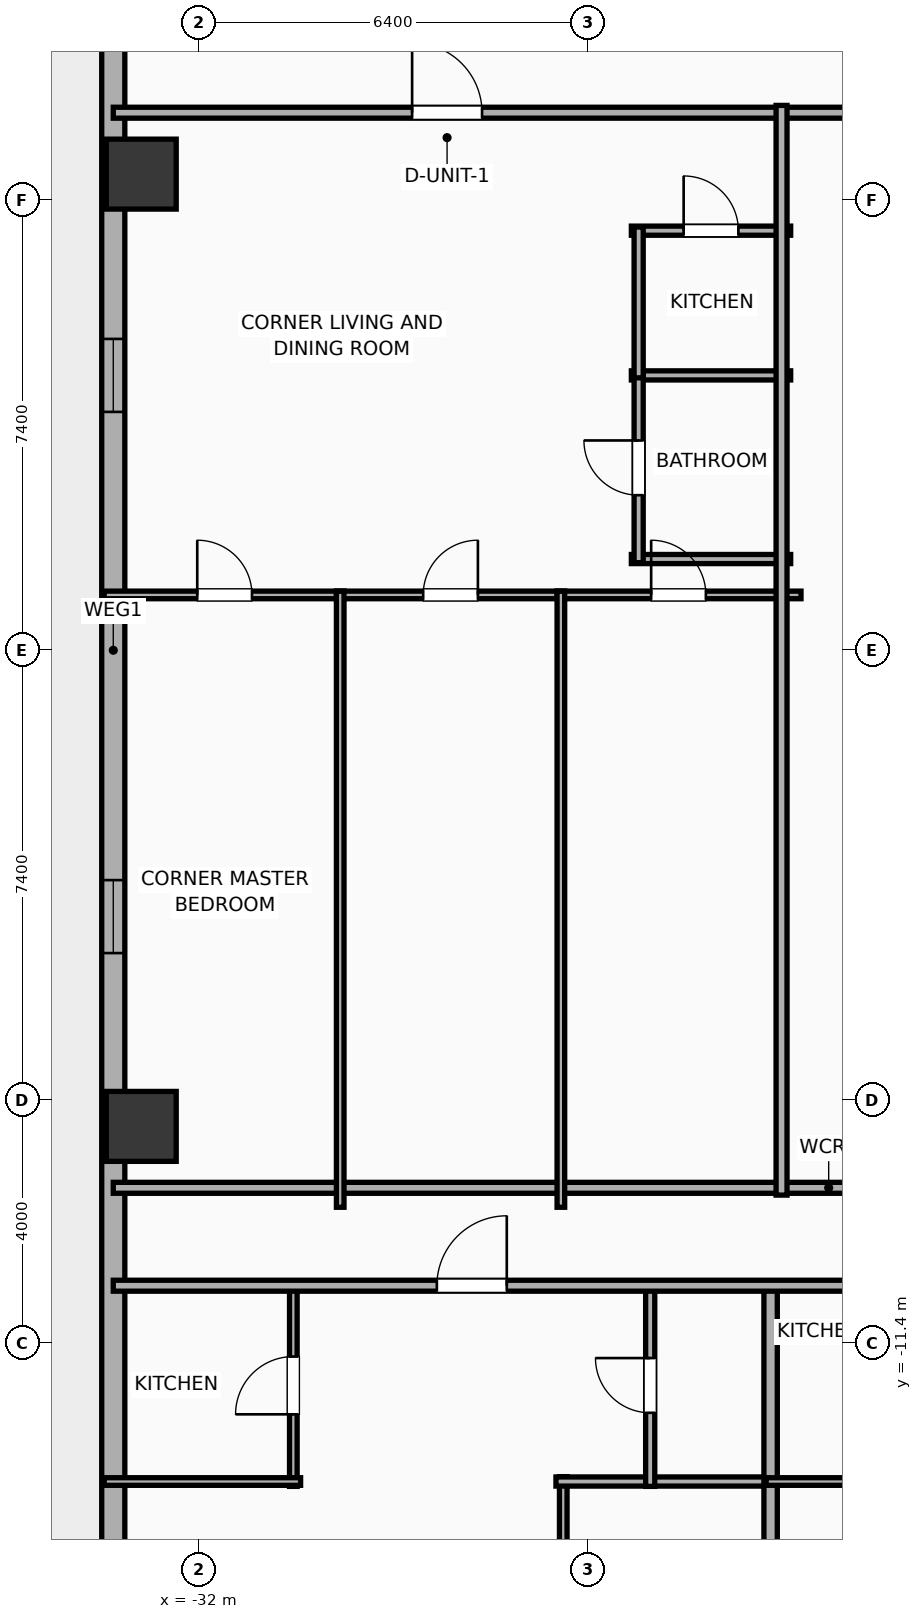
"""IFC4 building model, lengths in metres.
Left out: names, types, materials, properties, quantities, classifications, styles, units other than length and angle.
Written with IfcOpenShell. Run it as: python <this file> out.ifc"""

import sys

from ifc_helpers import new_model, si_unit, direction, frame, frame_2d, origin, origin_2d, place, context, subcontext, project, spatial, rectangle, hollow_rectangle, extrude, element, fill, save


model = new_model("IFC4")
c1 = context("Model", 3, precision=1e-05, world=origin(), true_north=direction((0.0, 1.0)))
c2 = subcontext(c1, "Body", "Model", "MODEL_VIEW")
j1 = project(units=[si_unit("LENGTHUNIT", "METRE"), si_unit("PLANEANGLEUNIT", "RADIAN")], contexts=[c1])
p1 = place(None, origin())
s1 = spatial("IfcSite", under=j1, at=p1, CompositionType="ELEMENT")
p2 = place(p1, origin())
s2 = spatial("IfcBuilding", under=s1, at=p2, CompositionType="ELEMENT")
p3 = place(p2, frame((0.0, 0.0, 26.0)))
s3 = spatial("IfcBuildingStorey", under=s2, at=p3, CompositionType="ELEMENT", Elevation=26.0)
for number, where, z_axis, x_axis in (
    (1, (-32.95, 7.83, -0.25), (0.0, 0.0, 1.0), (1.0, 0.0, 0.0)),
    (2, (-32.95, -7.83, -0.25), (0.0, 0.0, 1.0), (1.0, 0.0, 0.0)),
):
    element("IfcColumn", number, at=place(p3, frame(where, z_axis=z_axis, x_axis=x_axis)), inside=s3, PredefinedType="COLUMN", context=c2, shape_type="SweptSolid", body=[
        extrude(hollow_rectangle(XDim=1.15, YDim=1.15, WallThickness=0.04, at=origin_2d()), origin(), (0.0, 0.0, 1.0), 4.15),
    ])
p4 = place(p3, frame((-33.41, -18.381, 0.0), z_axis=(0.0, 0.0, 1.0), x_axis=(0.0, 1.0, 0.0)))
e3 = element("IfcWall", 3, at=p4, inside=s3, PredefinedType="ELEMENTEDWALL", context=c2, shape_type="SweptSolid", body=[
    extrude(rectangle(XDim=36.763, YDim=0.38, at=frame_2d((18.381, 0.0))), origin(), (0.0, 0.0, 1.0), 2.54),
])
p5 = place(p4, frame((33.362, 0.0, 0.75)))
e4 = element("IfcOpeningElement", 4, at=p5, cuts=e3, PredefinedType="OPENING", context=c2, shape_type="SweptSolid", body=[
    extrude(rectangle(XDim=1.2, YDim=1.63, at=frame_2d((0.6, 0.815))), frame((0.0, 0.2, 0.0), z_axis=(0.0, -1.0, 0.0), x_axis=(1.0, 0.0, 0.0)), (0.0, 0.0, 1.0), 0.4),
])
p6 = place(p4, frame((22.301, 0.0, 0.75)))
e5 = element("IfcOpeningElement", 5, at=p6, cuts=e3, PredefinedType="OPENING", context=c2, shape_type="SweptSolid", body=[
    extrude(rectangle(XDim=1.2, YDim=1.63, at=frame_2d((0.6, 0.815))), frame((0.0, 0.2, 0.0), z_axis=(0.0, -1.0, 0.0), x_axis=(1.0, 0.0, 0.0)), (0.0, 0.0, 1.0), 0.4),
])
p7 = place(p4, frame((13.401, 0.0, 0.75)))
e6 = element("IfcOpeningElement", 6, at=p7, cuts=e3, PredefinedType="OPENING", context=c2, shape_type="SweptSolid", body=[
    extrude(rectangle(XDim=1.2, YDim=1.63, at=frame_2d((0.6, 0.815))), frame((0.0, 0.2, 0.0), z_axis=(0.0, -1.0, 0.0), x_axis=(1.0, 0.0, 0.0)), (0.0, 0.0, 1.0), 0.4),
])
p8 = place(p3, frame((-33.41, 8.84, 0.0), z_axis=(0.0, 0.0, 1.0), x_axis=(1.0, 0.0, 0.0)))
e7 = element("IfcWall", 7, at=p8, inside=s3, PredefinedType="PARTITIONING", context=c2, shape_type="SweptSolid", body=[
    extrude(rectangle(XDim=23.53, YDim=0.18, at=frame_2d((11.765, 0.0))), origin(), (0.0, 0.0, 1.0), 3.65),
])
p9 = place(p8, frame((4.915, 0.0, 0.0)))
e8 = element("IfcOpeningElement", 8, at=p9, cuts=e7, PredefinedType="OPENING", context=c2, shape_type="SweptSolid", body=[
    extrude(rectangle(XDim=1.15, YDim=2.05, at=frame_2d((0.575, 1.025))), frame((0.0, 0.1, 0.0), z_axis=(0.0, -1.0, 0.0), x_axis=(1.0, 0.0, 0.0)), (0.0, 0.0, 1.0), 0.2),
])
p10 = place(p3, frame((-33.41, -8.84, 0.0), z_axis=(0.0, 0.0, 1.0), x_axis=(1.0, 0.0, 0.0)))
e9 = element("IfcWall", 9, at=p10, inside=s3, PredefinedType="PARTITIONING", context=c2, shape_type="SweptSolid", body=[
    extrude(rectangle(XDim=23.53, YDim=0.18, at=frame_2d((11.765, 0.0))), origin(), (0.0, 0.0, 1.0), 3.65),
])
p11 = place(p3, frame((-26.01, -22.36, 0.0), z_axis=(0.0, 0.0, 1.0), x_axis=(0.0, 1.0, 0.0)))
e10 = element("IfcWall", 10, at=p11, inside=s3, PredefinedType="PARTITIONING", context=c2, shape_type="SweptSolid", body=[
    extrude(rectangle(XDim=8.77, YDim=0.125, at=frame_2d((4.385, 0.0))), origin(), (0.0, 0.0, 1.0), 3.65),
])
p12 = place(p11, frame((6.215, 0.0, 0.0)))
e11 = element("IfcOpeningElement", 11, at=p12, cuts=e10, PredefinedType="OPENING", context=c2, shape_type="SweptSolid", body=[
    extrude(rectangle(XDim=0.9, YDim=2.05, at=frame_2d((0.45, 1.025))), frame((0.0, 0.073, 0.0), z_axis=(0.0, -1.0, 0.0), x_axis=(1.0, 0.0, 0.0)), (0.0, 0.0, 1.0), 0.145),
])
p13 = place(p3, frame((-26.13, -13.67, 0.0), z_axis=(0.0, 0.0, 1.0), x_axis=(1.0, 0.0, 0.0)))
e12 = element("IfcWall", 12, at=p13, inside=s3, PredefinedType="PLUMBINGWALL", context=c2, shape_type="SweptSolid", body=[
    extrude(rectangle(XDim=3.605, YDim=0.15, at=frame_2d((1.802, 0.0))), origin(), (0.0, 0.0, 1.0), 3.65),
])
p14 = place(p3, frame((-30.449, -13.75, 0.0), z_axis=(0.0, 0.0, 1.0), x_axis=(0.0, 1.0, 0.0)))
e13 = element("IfcWall", 13, at=p14, inside=s3, PredefinedType="PARTITIONING", context=c2, shape_type="SweptSolid", body=[
    extrude(rectangle(XDim=3.32, YDim=0.125, at=frame_2d((1.66, 0.0))), origin(), (0.0, 0.0, 1.0), 3.65),
])
p15 = place(p14, frame((1.185, 0.0, 0.0)))
e14 = element("IfcOpeningElement", 14, at=p15, cuts=e13, PredefinedType="OPENING", context=c2, shape_type="SweptSolid", body=[
    extrude(rectangle(XDim=0.95, YDim=2.05, at=frame_2d((0.475, 1.025))), frame((0.0, 0.073, 0.0), z_axis=(0.0, -1.0, 0.0), x_axis=(1.0, 0.0, 0.0)), (0.0, 0.0, 1.0), 0.145),
])
p16 = place(p3, frame((-33.56, -13.67, 0.0), z_axis=(0.0, 0.0, 1.0), x_axis=(1.0, 0.0, 0.0)))
e15 = element("IfcWall", 15, at=p16, inside=s3, PredefinedType="PARTITIONING", context=c2, shape_type="SweptSolid", body=[
    extrude(rectangle(XDim=3.231, YDim=0.125, at=frame_2d((1.615, 0.0))), origin(), (0.0, 0.0, 1.0), 3.65),
])
p17 = place(p3, frame((-24.58, -13.75, 0.0), z_axis=(0.0, 0.0, 1.0), x_axis=(0.0, 1.0, 0.0)))
e16 = element("IfcWall", 16, at=p17, inside=s3, PredefinedType="PLUMBINGWALL", context=c2, shape_type="SweptSolid", body=[
    extrude(rectangle(XDim=3.32, YDim=0.15, at=frame_2d((1.66, 0.0))), origin(), (0.0, 0.0, 1.0), 3.65),
])
p18 = place(p17, frame((1.21, 0.0, 0.0)))
e17 = element("IfcOpeningElement", 17, at=p18, cuts=e16, PredefinedType="OPENING", context=c2, shape_type="SweptSolid", body=[
    extrude(rectangle(XDim=0.9, YDim=2.05, at=frame_2d((0.45, 1.025))), frame((0.0, 0.085, 0.0), z_axis=(0.0, -1.0, 0.0), x_axis=(1.0, 0.0, 0.0)), (0.0, 0.0, 1.0), 0.17),
])
p19 = place(p3, frame((-22.6, -22.21, 0.0), z_axis=(0.0, 0.0, 1.0), x_axis=(0.0, 1.0, 0.0)))
e18 = element("IfcWall", 18, at=p19, inside=s3, PredefinedType="PARTITIONING", context=c2, shape_type="SweptSolid", body=[
    extrude(rectangle(XDim=11.84, YDim=0.22, at=frame_2d((5.92, 0.0))), origin(), (0.0, 0.0, 1.0), 3.65),
])
p20 = place(p3, frame((-22.675, -13.67, 0.0), z_axis=(0.0, 0.0, 1.0), x_axis=(1.0, 0.0, 0.0)))
e19 = element("IfcWall", 19, at=p20, inside=s3, PredefinedType="PARTITIONING", context=c2, shape_type="SweptSolid", body=[
    extrude(rectangle(XDim=2.505, YDim=0.125, at=frame_2d((1.252, 0.0))), origin(), (0.0, 0.0, 1.0), 3.65),
])
p21 = place(p3, frame((-33.41, -10.45, 0.0), z_axis=(0.0, 0.0, 1.0), x_axis=(1.0, 0.0, 0.0)))
e20 = element("IfcWall", 20, at=p21, inside=s3, PredefinedType="PARTITIONING", context=c2, shape_type="SweptSolid", body=[
    extrude(rectangle(XDim=59.62, YDim=0.18, at=frame_2d((29.81, 0.0))), origin(), (0.0, 0.0, 1.0), 3.65),
])
p22 = place(p21, frame((5.321, 0.0, 0.0)))
e21 = element("IfcOpeningElement", 21, at=p22, cuts=e20, PredefinedType="OPENING", context=c2, shape_type="SweptSolid", body=[
    extrude(rectangle(XDim=1.15, YDim=2.05, at=frame_2d((0.575, 1.025))), frame((0.0, 0.1, 0.0), z_axis=(0.0, -1.0, 0.0), x_axis=(1.0, 0.0, 0.0)), (0.0, 0.0, 1.0), 0.2),
])
p23 = place(p21, frame((14.3, 0.0, 0.0)))
e22 = element("IfcOpeningElement", 22, at=p23, cuts=e20, PredefinedType="OPENING", context=c2, shape_type="SweptSolid", body=[
    extrude(rectangle(XDim=1.15, YDim=2.05, at=frame_2d((0.575, 1.025))), frame((0.0, 0.1, 0.0), z_axis=(0.0, -1.0, 0.0), x_axis=(1.0, 0.0, 0.0)), (0.0, 0.0, 1.0), 0.2),
])
p24 = place(p21, frame((22.265, 0.0, 0.0)))
e23 = element("IfcOpeningElement", 23, at=p24, cuts=e20, PredefinedType="OPENING", context=c2, shape_type="SweptSolid", body=[
    extrude(rectangle(XDim=0.9, YDim=2.05, at=frame_2d((0.45, 1.025))), frame((0.0, 0.1, 0.0), z_axis=(0.0, -1.0, 0.0), x_axis=(1.0, 0.0, 0.0)), (0.0, 0.0, 1.0), 0.2),
])
p25 = place(p21, frame((29.903, 0.0, 0.0)))
e24 = element("IfcOpeningElement", 24, at=p25, cuts=e20, PredefinedType="OPENING", context=c2, shape_type="SweptSolid", body=[
    extrude(rectangle(XDim=1.15, YDim=2.05, at=frame_2d((0.575, 1.025))), frame((0.0, 0.1, 0.0), z_axis=(0.0, -1.0, 0.0), x_axis=(1.0, 0.0, 0.0)), (0.0, 0.0, 1.0), 0.2),
])
p26 = place(p21, frame((37.701, 0.0, 0.0)))
e25 = element("IfcOpeningElement", 25, at=p26, cuts=e20, PredefinedType="OPENING", context=c2, shape_type="SweptSolid", body=[
    extrude(rectangle(XDim=1.15, YDim=2.05, at=frame_2d((0.575, 1.025))), frame((0.0, 0.1, 0.0), z_axis=(0.0, -1.0, 0.0), x_axis=(1.0, 0.0, 0.0)), (0.0, 0.0, 1.0), 0.2),
])
p27 = place(p21, frame((45.654, 0.0, 0.0)))
e26 = element("IfcOpeningElement", 26, at=p27, cuts=e20, PredefinedType="OPENING", context=c2, shape_type="SweptSolid", body=[
    extrude(rectangle(XDim=0.9, YDim=2.05, at=frame_2d((0.45, 1.025))), frame((0.0, 0.1, 0.0), z_axis=(0.0, -1.0, 0.0), x_axis=(1.0, 0.0, 0.0)), (0.0, 0.0, 1.0), 0.2),
])
p28 = place(p21, frame((54.472, 0.0, 0.0)))
e27 = element("IfcOpeningElement", 27, at=p28, cuts=e20, PredefinedType="OPENING", context=c2, shape_type="SweptSolid", body=[
    extrude(rectangle(XDim=1.15, YDim=2.05, at=frame_2d((0.575, 1.025))), frame((0.0, 0.1, 0.0), z_axis=(0.0, -1.0, 0.0), x_axis=(1.0, 0.0, 0.0)), (0.0, 0.0, 1.0), 0.2),
])
p29 = place(p3, frame((-24.89, 6.9, 0.0), z_axis=(0.0, 0.0, 1.0), x_axis=(1.0, 0.0, 0.0)))
e28 = element("IfcWall", 28, at=p29, inside=s3, PredefinedType="PLUMBINGWALL", context=c2, shape_type="SweptSolid", body=[
    extrude(rectangle(XDim=2.62, YDim=0.15, at=frame_2d((1.31, 0.0))), origin(), (0.0, 0.0, 1.0), 2.54),
])
p30 = place(p29, frame((0.86, 0.0, 0.0)))
e29 = element("IfcOpeningElement", 29, at=p30, cuts=e28, PredefinedType="OPENING", context=c2, shape_type="SweptSolid", body=[
    extrude(rectangle(XDim=0.9, YDim=2.05, at=frame_2d((0.45, 1.025))), frame((0.0, 0.085, 0.0), z_axis=(0.0, -1.0, 0.0), x_axis=(1.0, 0.0, 0.0)), (0.0, 0.0, 1.0), 0.17),
])
for number, where, z_axis, x_axis in (
    (30, (-24.89, 4.52, 0.0), (0.0, 0.0, 1.0), (1.0, 0.0, 0.0)),
    (31, (-24.89, 1.5, 0.0), (0.0, 0.0, 1.0), (1.0, 0.0, 0.0)),
):
    element("IfcWall", number, at=place(p3, frame(where, z_axis=z_axis, x_axis=x_axis)), inside=s3, PredefinedType="PLUMBINGWALL", context=c2, shape_type="SweptSolid", body=[
        extrude(rectangle(XDim=2.62, YDim=0.15, at=frame_2d((1.31, 0.0))), origin(), (0.0, 0.0, 1.0), 3.65),
    ])
p31 = place(p3, frame((-24.77, 1.44, 0.0), z_axis=(0.0, 0.0, 1.0), x_axis=(0.0, 1.0, 0.0)))
e32 = element("IfcWall", 32, at=p31, inside=s3, PredefinedType="PLUMBINGWALL", context=c2, shape_type="SweptSolid", body=[
    extrude(rectangle(XDim=3.12, YDim=0.15, at=frame_2d((1.56, 0.0))), origin(), (0.0, 0.0, 1.0), 3.65),
])
p32 = place(p31, frame((1.11, 0.0, 0.0)))
e33 = element("IfcOpeningElement", 33, at=p32, cuts=e32, PredefinedType="OPENING", context=c2, shape_type="SweptSolid", body=[
    extrude(rectangle(XDim=0.9, YDim=2.05, at=frame_2d((0.45, 1.025))), frame((0.0, 0.085, 0.0), z_axis=(0.0, -1.0, 0.0), x_axis=(1.0, 0.0, 0.0)), (0.0, 0.0, 1.0), 0.17),
])
p33 = place(p3, frame((-24.77, 4.48, 0.0), z_axis=(0.0, 0.0, 1.0), x_axis=(0.0, 1.0, 0.0)))
e34 = element("IfcWall", 34, at=p33, inside=s3, PredefinedType="PLUMBINGWALL", context=c2, shape_type="SweptSolid", body=[
    extrude(rectangle(XDim=2.48, YDim=0.15, at=frame_2d((1.24, 0.0))), origin(), (0.0, 0.0, 1.0), 3.65),
])
p34 = place(p3, frame((-33.56, 0.91, 0.0), z_axis=(0.0, 0.0, 1.0), x_axis=(1.0, 0.0, 0.0)))
e35 = element("IfcWall", 35, at=p34, inside=s3, PredefinedType="PARTITIONING", context=c2, shape_type="SweptSolid", body=[
    extrude(rectangle(XDim=3.945, YDim=0.125, at=frame_2d((1.972, 0.0))), origin(), (0.0, 0.0, 1.0), 3.65),
])
p35 = place(p34, frame((1.531, 0.0, 0.0)))
e36 = element("IfcOpeningElement", 36, at=p35, cuts=e35, PredefinedType="OPENING", context=c2, shape_type="SweptSolid", body=[
    extrude(rectangle(XDim=0.9, YDim=2.05, at=frame_2d((0.45, 1.025))), frame((0.0, 0.073, 0.0), z_axis=(0.0, -1.0, 0.0), x_axis=(1.0, 0.0, 0.0)), (0.0, 0.0, 1.0), 0.145),
])
p36 = place(p3, frame((-29.74, 0.91, 0.0), z_axis=(0.0, 0.0, 1.0), x_axis=(1.0, 0.0, 0.0)))
e37 = element("IfcWall", 37, at=p36, inside=s3, PredefinedType="PARTITIONING", context=c2, shape_type="SweptSolid", body=[
    extrude(rectangle(XDim=3.754, YDim=0.125, at=frame_2d((1.877, 0.0))), origin(), (0.0, 0.0, 1.0), 3.65),
])
p37 = place(p36, frame((1.427, 0.0, 0.0)))
e38 = element("IfcOpeningElement", 38, at=p37, cuts=e37, PredefinedType="OPENING", context=c2, shape_type="SweptSolid", body=[
    extrude(rectangle(XDim=0.9, YDim=2.05, at=frame_2d((0.45, 1.025))), frame((0.0, 0.073, 0.0), z_axis=(0.0, -1.0, 0.0), x_axis=(1.0, 0.0, 0.0)), (0.0, 0.0, 1.0), 0.145),
])
p38 = place(p3, frame((-26.112, 0.91, 0.0), z_axis=(0.0, 0.0, 1.0), x_axis=(1.0, 0.0, 0.0)))
e39 = element("IfcWall", 39, at=p38, inside=s3, PredefinedType="PARTITIONING", context=c2, shape_type="SweptSolid", body=[
    extrude(rectangle(XDim=4.011, YDim=0.125, at=frame_2d((2.006, 0.0))), origin(), (0.0, 0.0, 1.0), 3.65),
])
p39 = place(p38, frame((1.547, 0.0, 0.0)))
e40 = element("IfcOpeningElement", 40, at=p39, cuts=e39, PredefinedType="OPENING", context=c2, shape_type="SweptSolid", body=[
    extrude(rectangle(XDim=0.9, YDim=2.05, at=frame_2d((0.45, 1.025))), frame((0.0, 0.073, 0.0), z_axis=(0.0, -1.0, 0.0), x_axis=(1.0, 0.0, 0.0)), (0.0, 0.0, 1.0), 0.145),
])
for number, where, z_axis, x_axis in (
    (41, (-26.049, -9.16, 0.0), (0.0, 0.0, 1.0), (0.0, 1.0, 0.0)),
    (42, (-29.678, -9.16, 0.0), (0.0, 0.0, 1.0), (0.0, 1.0, 0.0)),
):
    element("IfcWall", number, at=place(p3, frame(where, z_axis=z_axis, x_axis=x_axis)), inside=s3, PredefinedType="PARTITIONING", context=c2, shape_type="SweptSolid", body=[
        extrude(rectangle(XDim=10.13, YDim=0.125, at=frame_2d((5.065, 0.0))), origin(), (0.0, 0.0, 1.0), 3.65),
    ])
p40 = place(p3, frame((-22.42, -8.96, 0.0), z_axis=(0.0, 0.0, 1.0), x_axis=(0.0, 1.0, 0.0)))
e43 = element("IfcWall", 43, at=p40, inside=s3, PredefinedType="PARTITIONING", context=c2, shape_type="SweptSolid", body=[
    extrude(rectangle(XDim=17.92, YDim=0.18, at=frame_2d((8.96, 0.0))), origin(), (0.0, 0.0, 1.0), 3.65),
])
p41 = place(p6, origin())
e44 = element("IfcWindow", 44, at=p41, inside=s3, PartitioningType="SINGLE_PANEL", PredefinedType="WINDOW", context=c2, shape_type="SweptSolid", body=[
    extrude(rectangle(XDim=1.2, YDim=1.63, at=frame_2d((0.6, 0.815))), frame((0.0, 0.03, 0.0), z_axis=(0.0, -1.0, 0.0), x_axis=(1.0, 0.0, 0.0)), (0.0, 0.0, 1.0), 0.06),
])
fill(e5, e44)
p42 = place(p7, origin())
e45 = element("IfcWindow", 45, at=p42, inside=s3, PartitioningType="SINGLE_PANEL", PredefinedType="WINDOW", context=c2, shape_type="SweptSolid", body=[
    extrude(rectangle(XDim=1.2, YDim=1.63, at=frame_2d((0.6, 0.815))), frame((0.0, 0.03, 0.0), z_axis=(0.0, -1.0, 0.0), x_axis=(1.0, 0.0, 0.0)), (0.0, 0.0, 1.0), 0.06),
])
fill(e6, e45)
p43 = place(p9, origin())
e46 = element("IfcDoor", 46, at=p43, inside=s3, OperationType="SINGLE_SWING_LEFT", PredefinedType="DOOR", context=c2, shape_type="SweptSolid", body=[
    extrude(rectangle(XDim=1.15, YDim=2.05, at=frame_2d((0.575, 1.025))), frame((0.0, 0.025, 0.0), z_axis=(0.0, -1.0, 0.0), x_axis=(1.0, 0.0, 0.0)), (0.0, 0.0, 1.0), 0.05),
])
fill(e8, e46)
p44 = place(p15, origin())
e47 = element("IfcDoor", 47, at=p44, inside=s3, OperationType="SINGLE_SWING_LEFT", PredefinedType="DOOR", context=c2, shape_type="SweptSolid", body=[
    extrude(rectangle(XDim=0.95, YDim=2.05, at=frame_2d((0.475, 1.025))), frame((0.0, 0.025, 0.0), z_axis=(0.0, -1.0, 0.0), x_axis=(1.0, 0.0, 0.0)), (0.0, 0.0, 1.0), 0.05),
])
fill(e14, e47)
p45 = place(p18, origin())
e48 = element("IfcDoor", 48, at=p45, inside=s3, OperationType="SINGLE_SWING_RIGHT", PredefinedType="DOOR", context=c2, shape_type="SweptSolid", body=[
    extrude(rectangle(XDim=0.9, YDim=2.05, at=frame_2d((0.45, 1.025))), frame((0.0, 0.025, 0.0), z_axis=(0.0, -1.0, 0.0), x_axis=(1.0, 0.0, 0.0)), (0.0, 0.0, 1.0), 0.05),
])
fill(e17, e48)
p46 = place(p22, origin())
e49 = element("IfcDoor", 49, at=p46, inside=s3, OperationType="SINGLE_SWING_RIGHT", PredefinedType="DOOR", context=c2, shape_type="SweptSolid", body=[
    extrude(rectangle(XDim=1.15, YDim=2.05, at=frame_2d((0.575, 1.025))), frame((0.0, 0.025, 0.0), z_axis=(0.0, -1.0, 0.0), x_axis=(1.0, 0.0, 0.0)), (0.0, 0.0, 1.0), 0.05),
])
fill(e21, e49)
p47 = place(p30, origin())
e50 = element("IfcDoor", 50, at=p47, inside=s3, OperationType="SINGLE_SWING_LEFT", PredefinedType="DOOR", context=c2, shape_type="SweptSolid", body=[
    extrude(rectangle(XDim=0.9, YDim=2.05, at=frame_2d((0.45, 1.025))), frame((0.0, 0.025, 0.0), z_axis=(0.0, -1.0, 0.0), x_axis=(1.0, 0.0, 0.0)), (0.0, 0.0, 1.0), 0.05),
])
fill(e29, e50)
p48 = place(p32, origin())
e51 = element("IfcDoor", 51, at=p48, inside=s3, OperationType="SINGLE_SWING_RIGHT", PredefinedType="DOOR", context=c2, shape_type="SweptSolid", body=[
    extrude(rectangle(XDim=0.9, YDim=2.05, at=frame_2d((0.45, 1.025))), frame((0.0, 0.025, 0.0), z_axis=(0.0, -1.0, 0.0), x_axis=(1.0, 0.0, 0.0)), (0.0, 0.0, 1.0), 0.05),
])
fill(e33, e51)
p49 = place(p35, origin())
e52 = element("IfcDoor", 52, at=p49, inside=s3, OperationType="SINGLE_SWING_LEFT", PredefinedType="DOOR", context=c2, shape_type="SweptSolid", body=[
    extrude(rectangle(XDim=0.9, YDim=2.05, at=frame_2d((0.45, 1.025))), frame((0.0, 0.025, 0.0), z_axis=(0.0, -1.0, 0.0), x_axis=(1.0, 0.0, 0.0)), (0.0, 0.0, 1.0), 0.05),
])
fill(e36, e52)
p50 = place(p37, origin())
e53 = element("IfcDoor", 53, at=p50, inside=s3, OperationType="SINGLE_SWING_RIGHT", PredefinedType="DOOR", context=c2, shape_type="SweptSolid", body=[
    extrude(rectangle(XDim=0.9, YDim=2.05, at=frame_2d((0.45, 1.025))), frame((0.0, 0.025, 0.0), z_axis=(0.0, -1.0, 0.0), x_axis=(1.0, 0.0, 0.0)), (0.0, 0.0, 1.0), 0.05),
])
fill(e38, e53)
p51 = place(p39, origin())
e54 = element("IfcDoor", 54, at=p51, inside=s3, OperationType="SINGLE_SWING_LEFT", PredefinedType="DOOR", context=c2, shape_type="SweptSolid", body=[
    extrude(rectangle(XDim=0.9, YDim=2.05, at=frame_2d((0.45, 1.025))), frame((0.0, 0.025, 0.0), z_axis=(0.0, -1.0, 0.0), x_axis=(1.0, 0.0, 0.0)), (0.0, 0.0, 1.0), 0.05),
])
fill(e40, e54)
save(model, sys.argv[1])
